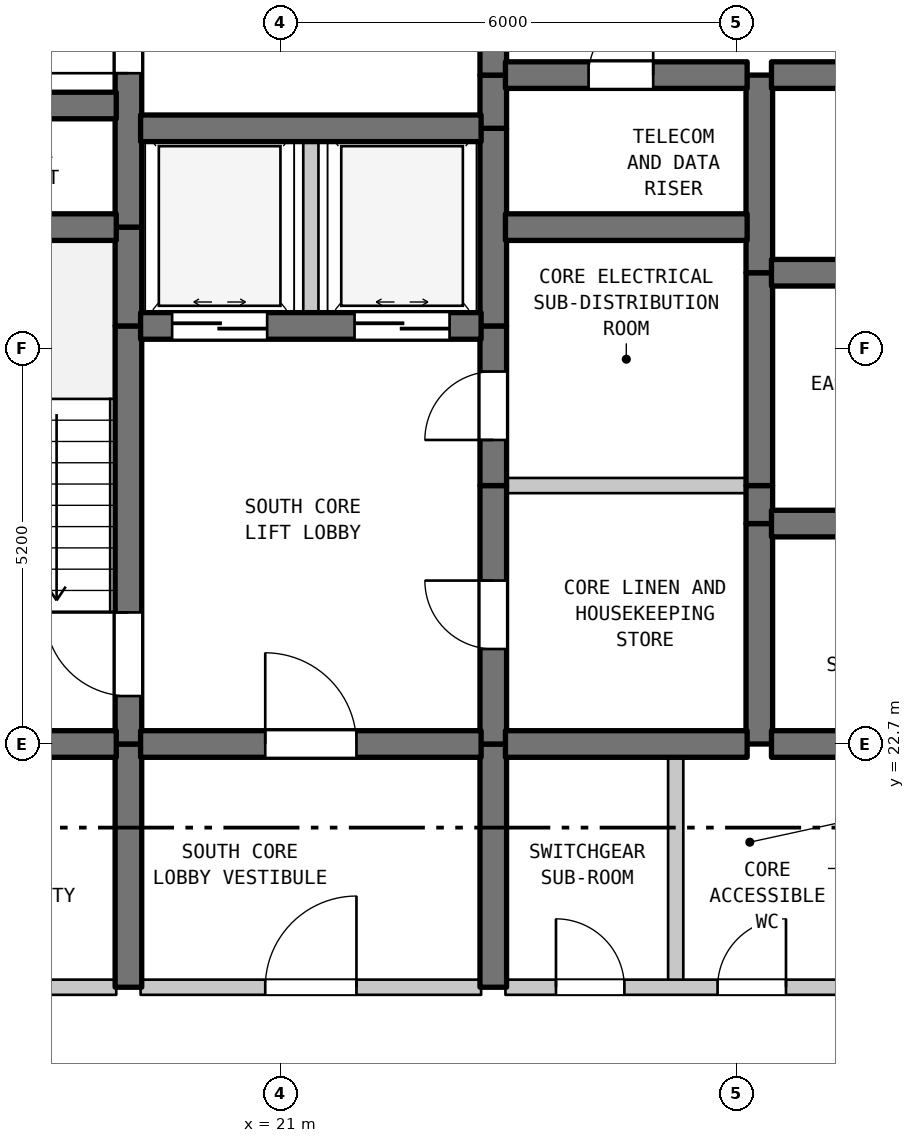
"""IFC4 building model, lengths in metres.
Left out: names, types, materials, properties, quantities, classifications, styles, units other than length and angle.
Written with IfcOpenShell. Run it as: python <this file> out.ifc"""

import sys

from ifc_helpers import new_model, si_unit, direction, frame, frame_2d, origin, place, context, subcontext, project, spatial, rectangle, extrude, element, fill, save


model = new_model("IFC4")
c1 = context("Model", 3, precision=1e-05, world=origin(), true_north=direction((0.0, 1.0)))
c2 = subcontext(c1, "Body", "Model", "MODEL_VIEW")
j1 = project(units=[si_unit("LENGTHUNIT", "METRE"), si_unit("PLANEANGLEUNIT", "RADIAN")], contexts=[c1])
p1 = place(None, origin())
s1 = spatial("IfcSite", under=j1, at=p1, CompositionType="ELEMENT")
p2 = place(p1, origin())
s2 = spatial("IfcBuilding", under=s1, at=p2, CompositionType="ELEMENT")
p3 = place(p2, frame((0.0, 0.0, 284.3)))
s3 = spatial("IfcBuildingStorey", under=s2, at=p3, CompositionType="ELEMENT", Elevation=284.3)
p4 = place(p3, frame((19.0, 19.5, 0.0), z_axis=(0.0, 0.0, 1.0), x_axis=(0.0, 1.0, 0.0)))
e1 = element("IfcWall", 1, at=p4, inside=s3, PredefinedType="SHEAR", context=c2, shape_type="SweptSolid", body=[
    extrude(rectangle(XDim=3.2, YDim=0.35, at=frame_2d((1.6, 0.0))), origin(), (0.0, 0.0, 1.0), 3.39),
])
p5 = place(p3, frame((19.0, 22.7, 0.0), z_axis=(0.0, 0.0, 1.0), x_axis=(0.0, 1.0, 0.0)))
e2 = element("IfcWall", 2, at=p5, inside=s3, PredefinedType="SHEAR", context=c2, shape_type="SweptSolid", body=[
    extrude(rectangle(XDim=5.5, YDim=0.35, at=frame_2d((2.75, 0.0))), origin(), (0.0, 0.0, 1.0), 3.39),
])
p6 = place(p5, frame((0.631, 0.0, 0.0)))
e3 = element("IfcOpeningElement", 3, at=p6, cuts=e2, PredefinedType="OPENING", context=c2, shape_type="SweptSolid", body=[
    extrude(rectangle(XDim=1.1, YDim=2.15, at=frame_2d((0.55, 1.075))), frame((0.0, 0.185, 0.0), z_axis=(0.0, -1.0, 0.0), x_axis=(1.0, 0.0, 0.0)), (0.0, 0.0, 1.0), 0.37),
])
p7 = place(p3, frame((19.0, 28.2, 0.0), z_axis=(0.0, 0.0, 1.0), x_axis=(0.0, 1.0, 0.0)))
e4 = element("IfcWall", 4, at=p7, inside=s3, PredefinedType="SHEAR", context=c2, shape_type="SweptSolid", body=[
    extrude(rectangle(XDim=1.3, YDim=0.35, at=frame_2d((0.65, 0.0))), origin(), (0.0, 0.0, 1.0), 3.39),
])
p8 = place(p3, frame((19.0, 29.5, 0.0), z_axis=(0.0, 0.0, 1.0), x_axis=(0.0, 1.0, 0.0)))
e5 = element("IfcWall", 5, at=p8, inside=s3, PredefinedType="SHEAR", context=c2, shape_type="SweptSolid", body=[
    extrude(rectangle(XDim=5.5, YDim=0.35, at=frame_2d((2.75, 0.0))), origin(), (0.0, 0.0, 1.0), 3.39),
])
p9 = place(p8, frame((2.025, 0.0, 0.0)))
e6 = element("IfcOpeningElement", 6, at=p9, cuts=e5, PredefinedType="OPENING", context=c2, shape_type="SweptSolid", body=[
    extrude(rectangle(XDim=1.1, YDim=2.15, at=frame_2d((0.55, 1.075))), frame((0.0, 0.185, 0.0), z_axis=(0.0, -1.0, 0.0), x_axis=(1.0, 0.0, 0.0)), (0.0, 0.0, 1.0), 0.37),
])
p10 = place(p3, frame((21.4, 28.2, 0.0), z_axis=(0.0, 0.0, 1.0), x_axis=(0.0, 1.0, 0.0)))
e7 = element("IfcWall", 7, at=p10, inside=s3, PredefinedType="STANDARD", context=c2, shape_type="SweptSolid", body=[
    extrude(rectangle(XDim=2.6, YDim=0.2, at=frame_2d((1.3, 0.0))), origin(), (0.0, 0.0, 1.0), 3.39),
])
p11 = place(p3, frame((23.8, 19.5, 0.0), z_axis=(0.0, 0.0, 1.0), x_axis=(0.0, 1.0, 0.0)))
e8 = element("IfcWall", 8, at=p11, inside=s3, PredefinedType="SHEAR", context=c2, shape_type="SweptSolid", body=[
    extrude(rectangle(XDim=3.2, YDim=0.35, at=frame_2d((1.6, 0.0))), origin(), (0.0, 0.0, 1.0), 3.39),
])
p12 = place(p3, frame((23.8, 22.7, 0.0), z_axis=(0.0, 0.0, 1.0), x_axis=(0.0, 1.0, 0.0)))
e9 = element("IfcWall", 9, at=p12, inside=s3, PredefinedType="SHEAR", context=c2, shape_type="SweptSolid", body=[
    extrude(rectangle(XDim=3.4, YDim=0.35, at=frame_2d((1.7, 0.0))), origin(), (0.0, 0.0, 1.0), 3.39),
])
p13 = place(p12, frame((1.25, 0.0, 0.0)))
e10 = element("IfcOpeningElement", 10, at=p13, cuts=e9, PredefinedType="OPENING", context=c2, shape_type="SweptSolid", body=[
    extrude(rectangle(XDim=0.9, YDim=2.15, at=frame_2d((0.45, 1.075))), frame((0.0, 0.185, 0.0), z_axis=(0.0, -1.0, 0.0), x_axis=(1.0, 0.0, 0.0)), (0.0, 0.0, 1.0), 0.37),
])
p14 = place(p3, frame((23.8, 26.1, 0.0), z_axis=(0.0, 0.0, 1.0), x_axis=(0.0, 1.0, 0.0)))
e11 = element("IfcWall", 11, at=p14, inside=s3, PredefinedType="SHEAR", context=c2, shape_type="SweptSolid", body=[
    extrude(rectangle(XDim=2.1, YDim=0.35, at=frame_2d((1.05, 0.0))), origin(), (0.0, 0.0, 1.0), 3.39),
])
p15 = place(p14, frame((0.6, 0.0, 0.0)))
e12 = element("IfcOpeningElement", 12, at=p15, cuts=e11, PredefinedType="OPENING", context=c2, shape_type="SweptSolid", body=[
    extrude(rectangle(XDim=0.9, YDim=2.15, at=frame_2d((0.45, 1.075))), frame((0.0, 0.185, 0.0), z_axis=(0.0, -1.0, 0.0), x_axis=(1.0, 0.0, 0.0)), (0.0, 0.0, 1.0), 0.37),
])
p16 = place(p3, frame((23.8, 28.2, 0.0), z_axis=(0.0, 0.0, 1.0), x_axis=(0.0, 1.0, 0.0)))
e13 = element("IfcWall", 13, at=p16, inside=s3, PredefinedType="SHEAR", context=c2, shape_type="SweptSolid", body=[
    extrude(rectangle(XDim=2.6, YDim=0.35, at=frame_2d((1.3, 0.0))), origin(), (0.0, 0.0, 1.0), 3.39),
])
p17 = place(p3, frame((23.8, 30.8, 0.0), z_axis=(0.0, 0.0, 1.0), x_axis=(0.0, 1.0, 0.0)))
e14 = element("IfcWall", 14, at=p17, inside=s3, PredefinedType="SHEAR", context=c2, shape_type="SweptSolid", body=[
    extrude(rectangle(XDim=0.7, YDim=0.35, at=frame_2d((0.35, 0.0))), origin(), (0.0, 0.0, 1.0), 3.39),
])
p18 = place(p3, frame((23.8, 31.5, 0.0), z_axis=(0.0, 0.0, 1.0), x_axis=(0.0, 1.0, 0.0)))
e15 = element("IfcWall", 15, at=p18, inside=s3, PredefinedType="SHEAR", context=c2, shape_type="SweptSolid", body=[
    extrude(rectangle(XDim=3.5, YDim=0.35, at=frame_2d((1.75, 0.0))), origin(), (0.0, 0.0, 1.0), 3.39),
])
p19 = place(p18, frame((1.127, 0.0, 0.0)))
e16 = element("IfcOpeningElement", 16, at=p19, cuts=e15, PredefinedType="OPENING", context=c2, shape_type="SweptSolid", body=[
    extrude(rectangle(XDim=1.1, YDim=2.15, at=frame_2d((0.55, 1.075))), frame((0.0, 0.185, 0.0), z_axis=(0.0, -1.0, 0.0), x_axis=(1.0, 0.0, 0.0)), (0.0, 0.0, 1.0), 0.37),
])
p20 = place(p3, frame((26.2, 19.5, 0.0), z_axis=(0.0, 0.0, 1.0), x_axis=(0.0, 1.0, 0.0)))
e17 = element("IfcWall", 17, at=p20, inside=s3, PredefinedType="STANDARD", context=c2, shape_type="SweptSolid", body=[
    extrude(rectangle(XDim=3.2, YDim=0.2, at=frame_2d((1.6, 0.0))), origin(), (0.0, 0.0, 1.0), 3.39),
])
p21 = place(p3, frame((27.3, 22.7, 0.0), z_axis=(0.0, 0.0, 1.0), x_axis=(0.0, 1.0, 0.0)))
e18 = element("IfcWall", 18, at=p21, inside=s3, PredefinedType="SHEAR", context=c2, shape_type="SweptSolid", body=[
    extrude(rectangle(XDim=2.9, YDim=0.35, at=frame_2d((1.45, 0.0))), origin(), (0.0, 0.0, 1.0), 3.39),
])
p22 = place(p3, frame((27.3, 25.6, 0.0), z_axis=(0.0, 0.0, 1.0), x_axis=(0.0, 1.0, 0.0)))
e19 = element("IfcWall", 19, at=p22, inside=s3, PredefinedType="SHEAR", context=c2, shape_type="SweptSolid", body=[
    extrude(rectangle(XDim=0.5, YDim=0.35, at=frame_2d((0.25, 0.0))), origin(), (0.0, 0.0, 1.0), 3.39),
])
p23 = place(p3, frame((27.3, 26.1, 0.0), z_axis=(0.0, 0.0, 1.0), x_axis=(0.0, 1.0, 0.0)))
e20 = element("IfcWall", 20, at=p23, inside=s3, PredefinedType="SHEAR", context=c2, shape_type="SweptSolid", body=[
    extrude(rectangle(XDim=2.8, YDim=0.35, at=frame_2d((1.4, 0.0))), origin(), (0.0, 0.0, 1.0), 3.39),
])
p24 = place(p3, frame((27.3, 28.9, 0.0), z_axis=(0.0, 0.0, 1.0), x_axis=(0.0, 1.0, 0.0)))
e21 = element("IfcWall", 21, at=p24, inside=s3, PredefinedType="SHEAR", context=c2, shape_type="SweptSolid", body=[
    extrude(rectangle(XDim=2.6, YDim=0.35, at=frame_2d((1.3, 0.0))), origin(), (0.0, 0.0, 1.0), 3.39),
])
p25 = place(p3, frame((15.16, 19.5, 0.0), z_axis=(0.0, 0.0, 1.0), x_axis=(1.0, 0.0, 0.0)))
e22 = element("IfcWall", 22, at=p25, inside=s3, PredefinedType="STANDARD", context=c2, shape_type="SweptSolid", body=[
    extrude(rectangle(XDim=3.68, YDim=0.2, at=frame_2d((1.84, 0.0))), origin(), (0.0, 0.0, 1.0), 3.39),
])
p26 = place(p25, frame((1.39, 0.0, 0.0)))
e23 = element("IfcOpeningElement", 23, at=p26, cuts=e22, PredefinedType="OPENING", context=c2, shape_type="SweptSolid", body=[
    extrude(rectangle(XDim=0.9, YDim=2.15, at=frame_2d((0.45, 1.075))), frame((0.0, 0.11, 0.0), z_axis=(0.0, -1.0, 0.0), x_axis=(1.0, 0.0, 0.0)), (0.0, 0.0, 1.0), 0.22),
])
p27 = place(p3, frame((19.16, 19.5, 0.0), z_axis=(0.0, 0.0, 1.0), x_axis=(1.0, 0.0, 0.0)))
e24 = element("IfcWall", 24, at=p27, inside=s3, PredefinedType="STANDARD", context=c2, shape_type="SweptSolid", body=[
    extrude(rectangle(XDim=4.48, YDim=0.2, at=frame_2d((2.24, 0.0))), origin(), (0.0, 0.0, 1.0), 3.39),
])
p28 = place(p27, frame((1.64, 0.0, 0.0)))
e25 = element("IfcOpeningElement", 25, at=p28, cuts=e24, PredefinedType="OPENING", context=c2, shape_type="SweptSolid", body=[
    extrude(rectangle(XDim=1.2, YDim=2.2, at=frame_2d((0.6, 1.1))), frame((0.0, 0.11, 0.0), z_axis=(0.0, -1.0, 0.0), x_axis=(1.0, 0.0, 0.0)), (0.0, 0.0, 1.0), 0.22),
])
p29 = place(p3, frame((23.96, 19.5, 0.0), z_axis=(0.0, 0.0, 1.0), x_axis=(1.0, 0.0, 0.0)))
e26 = element("IfcWall", 26, at=p29, inside=s3, PredefinedType="STANDARD", context=c2, shape_type="SweptSolid", body=[
    extrude(rectangle(XDim=4.455, YDim=0.2, at=frame_2d((2.228, 0.0))), origin(), (0.0, 0.0, 1.0), 3.39),
])
p30 = place(p29, frame((0.665, 0.0, 0.0)))
e27 = element("IfcOpeningElement", 27, at=p30, cuts=e26, PredefinedType="OPENING", context=c2, shape_type="SweptSolid", body=[
    extrude(rectangle(XDim=0.9, YDim=2.15, at=frame_2d((0.45, 1.075))), frame((0.0, 0.11, 0.0), z_axis=(0.0, -1.0, 0.0), x_axis=(1.0, 0.0, 0.0)), (0.0, 0.0, 1.0), 0.22),
])
p31 = place(p29, frame((2.791, 0.0, 0.0)))
e28 = element("IfcOpeningElement", 28, at=p31, cuts=e26, PredefinedType="OPENING", context=c2, shape_type="SweptSolid", body=[
    extrude(rectangle(XDim=0.9, YDim=2.15, at=frame_2d((0.45, 1.075))), frame((0.0, 0.11, 0.0), z_axis=(0.0, -1.0, 0.0), x_axis=(1.0, 0.0, 0.0)), (0.0, 0.0, 1.0), 0.22),
])
p32 = place(p3, frame((15.16, 22.7, 0.0), z_axis=(0.0, 0.0, 1.0), x_axis=(1.0, 0.0, 0.0)))
e29 = element("IfcWall", 29, at=p32, inside=s3, PredefinedType="SHEAR", context=c2, shape_type="SweptSolid", body=[
    extrude(rectangle(XDim=3.68, YDim=0.35, at=frame_2d((1.84, 0.0))), origin(), (0.0, 0.0, 1.0), 3.39),
])
p33 = place(p3, frame((19.16, 22.7, 0.0), z_axis=(0.0, 0.0, 1.0), x_axis=(1.0, 0.0, 0.0)))
e30 = element("IfcWall", 30, at=p33, inside=s3, PredefinedType="SHEAR", context=c2, shape_type="SweptSolid", body=[
    extrude(rectangle(XDim=4.48, YDim=0.35, at=frame_2d((2.24, 0.0))), origin(), (0.0, 0.0, 1.0), 3.39),
])
p34 = place(p33, frame((1.64, 0.0, 0.0)))
e31 = element("IfcOpeningElement", 31, at=p34, cuts=e30, PredefinedType="OPENING", context=c2, shape_type="SweptSolid", body=[
    extrude(rectangle(XDim=1.2, YDim=2.2, at=frame_2d((0.6, 1.1))), frame((0.0, 0.185, 0.0), z_axis=(0.0, -1.0, 0.0), x_axis=(1.0, 0.0, 0.0)), (0.0, 0.0, 1.0), 0.37),
])
p35 = place(p3, frame((23.96, 22.7, 0.0), z_axis=(0.0, 0.0, 1.0), x_axis=(1.0, 0.0, 0.0)))
e32 = element("IfcWall", 32, at=p35, inside=s3, PredefinedType="SHEAR", context=c2, shape_type="SweptSolid", body=[
    extrude(rectangle(XDim=3.18, YDim=0.35, at=frame_2d((1.59, 0.0))), origin(), (0.0, 0.0, 1.0), 3.39),
])
p36 = place(p3, frame((27.46, 22.7, 0.0), z_axis=(0.0, 0.0, 1.0), x_axis=(1.0, 0.0, 0.0)))
e33 = element("IfcWall", 33, at=p36, inside=s3, PredefinedType="SHEAR", context=c2, shape_type="SweptSolid", body=[
    extrude(rectangle(XDim=0.955, YDim=0.35, at=frame_2d((0.478, 0.0))), origin(), (0.0, 0.0, 1.0), 3.39),
])
p37 = place(p3, frame((27.46, 25.6, 0.0), z_axis=(0.0, 0.0, 1.0), x_axis=(1.0, 0.0, 0.0)))
e34 = element("IfcWall", 34, at=p37, inside=s3, PredefinedType="SHEAR", context=c2, shape_type="SweptSolid", body=[
    extrude(rectangle(XDim=3.18, YDim=0.35, at=frame_2d((1.59, 0.0))), origin(), (0.0, 0.0, 1.0), 3.39),
])
p38 = place(p37, frame((1.115, 0.0, 0.0)))
e35 = element("IfcOpeningElement", 35, at=p38, cuts=e34, PredefinedType="OPENING", context=c2, shape_type="SweptSolid", body=[
    extrude(rectangle(XDim=0.95, YDim=2.15, at=frame_2d((0.475, 1.075))), frame((0.0, 0.185, 0.0), z_axis=(0.0, -1.0, 0.0), x_axis=(1.0, 0.0, 0.0)), (0.0, 0.0, 1.0), 0.37),
])
p39 = place(p3, frame((23.96, 26.1, 0.0), z_axis=(0.0, 0.0, 1.0), x_axis=(1.0, 0.0, 0.0)))
e36 = element("IfcWall", 36, at=p39, inside=s3, PredefinedType="STANDARD", context=c2, shape_type="SweptSolid", body=[
    extrude(rectangle(XDim=3.18, YDim=0.2, at=frame_2d((1.59, 0.0))), origin(), (0.0, 0.0, 1.0), 3.39),
])
p40 = place(p3, frame((19.16, 28.2, 0.0), z_axis=(0.0, 0.0, 1.0), x_axis=(1.0, 0.0, 0.0)))
e37 = element("IfcWall", 37, at=p40, inside=s3, PredefinedType="SHEAR", context=c2, shape_type="SweptSolid", body=[
    extrude(rectangle(XDim=4.48, YDim=0.35, at=frame_2d((2.24, 0.0))), origin(), (0.0, 0.0, 1.0), 3.39),
])
p41 = place(p40, frame((0.415, 0.0, 0.0)))
e38 = element("IfcOpeningElement", 38, at=p41, cuts=e37, PredefinedType="OPENING", context=c2, shape_type="SweptSolid", body=[
    extrude(rectangle(XDim=1.25, YDim=2.2, at=frame_2d((0.625, 1.1))), frame((0.0, 0.185, 0.0), z_axis=(0.0, -1.0, 0.0), x_axis=(1.0, 0.0, 0.0)), (0.0, 0.0, 1.0), 0.37),
])
p42 = place(p40, frame((2.815, 0.0, 0.0)))
e39 = element("IfcOpeningElement", 39, at=p42, cuts=e37, PredefinedType="OPENING", context=c2, shape_type="SweptSolid", body=[
    extrude(rectangle(XDim=1.25, YDim=2.2, at=frame_2d((0.625, 1.1))), frame((0.0, 0.185, 0.0), z_axis=(0.0, -1.0, 0.0), x_axis=(1.0, 0.0, 0.0)), (0.0, 0.0, 1.0), 0.37),
])
p43 = place(p3, frame((27.46, 28.9, 0.0), z_axis=(0.0, 0.0, 1.0), x_axis=(1.0, 0.0, 0.0)))
e40 = element("IfcWall", 40, at=p43, inside=s3, PredefinedType="SHEAR", context=c2, shape_type="SweptSolid", body=[
    extrude(rectangle(XDim=3.18, YDim=0.35, at=frame_2d((1.59, 0.0))), origin(), (0.0, 0.0, 1.0), 3.39),
])
p44 = place(p43, frame((1.115, 0.0, 0.0)))
e41 = element("IfcOpeningElement", 41, at=p44, cuts=e40, PredefinedType="OPENING", context=c2, shape_type="SweptSolid", body=[
    extrude(rectangle(XDim=0.95, YDim=2.15, at=frame_2d((0.475, 1.075))), frame((0.0, 0.185, 0.0), z_axis=(0.0, -1.0, 0.0), x_axis=(1.0, 0.0, 0.0)), (0.0, 0.0, 1.0), 0.37),
])
p45 = place(p3, frame((15.16, 29.5, 0.0), z_axis=(0.0, 0.0, 1.0), x_axis=(1.0, 0.0, 0.0)))
e42 = element("IfcWall", 42, at=p45, inside=s3, PredefinedType="SHEAR", context=c2, shape_type="SweptSolid", body=[
    extrude(rectangle(XDim=3.68, YDim=0.35, at=frame_2d((1.84, 0.0))), origin(), (0.0, 0.0, 1.0), 3.39),
])
p46 = place(p3, frame((23.96, 29.5, 0.0), z_axis=(0.0, 0.0, 1.0), x_axis=(1.0, 0.0, 0.0)))
e43 = element("IfcWall", 43, at=p46, inside=s3, PredefinedType="SHEAR", context=c2, shape_type="SweptSolid", body=[
    extrude(rectangle(XDim=3.18, YDim=0.35, at=frame_2d((1.59, 0.0))), origin(), (0.0, 0.0, 1.0), 3.39),
])
p47 = place(p3, frame((19.16, 30.8, 0.0), z_axis=(0.0, 0.0, 1.0), x_axis=(1.0, 0.0, 0.0)))
e44 = element("IfcWall", 44, at=p47, inside=s3, PredefinedType="SHEAR", context=c2, shape_type="SweptSolid", body=[
    extrude(rectangle(XDim=4.48, YDim=0.35, at=frame_2d((2.24, 0.0))), origin(), (0.0, 0.0, 1.0), 3.39),
])
p48 = place(p3, frame((15.16, 31.1, 0.0), z_axis=(0.0, 0.0, 1.0), x_axis=(1.0, 0.0, 0.0)))
e45 = element("IfcWall", 45, at=p48, inside=s3, PredefinedType="SHEAR", context=c2, shape_type="SweptSolid", body=[
    extrude(rectangle(XDim=3.68, YDim=0.35, at=frame_2d((1.84, 0.0))), origin(), (0.0, 0.0, 1.0), 3.39),
])
p49 = place(p3, frame((23.96, 31.5, 0.0), z_axis=(0.0, 0.0, 1.0), x_axis=(1.0, 0.0, 0.0)))
e46 = element("IfcWall", 46, at=p49, inside=s3, PredefinedType="SHEAR", context=c2, shape_type="SweptSolid", body=[
    extrude(rectangle(XDim=3.18, YDim=0.35, at=frame_2d((1.59, 0.0))), origin(), (0.0, 0.0, 1.0), 3.39),
])
p50 = place(p49, frame((1.094, 0.0, 0.0)))
e47 = element("IfcOpeningElement", 47, at=p50, cuts=e46, PredefinedType="OPENING", context=c2, shape_type="SweptSolid", body=[
    extrude(rectangle(XDim=0.85, YDim=2.1, at=frame_2d((0.425, 1.05))), frame((0.0, 0.185, 0.0), z_axis=(0.0, -1.0, 0.0), x_axis=(1.0, 0.0, 0.0)), (0.0, 0.0, 1.0), 0.37),
])
p51 = place(p3, frame((27.46, 31.5, 0.0), z_axis=(0.0, 0.0, 1.0), x_axis=(1.0, 0.0, 0.0)))
e48 = element("IfcWall", 48, at=p51, inside=s3, PredefinedType="SHEAR", context=c2, shape_type="SweptSolid", body=[
    extrude(rectangle(XDim=3.18, YDim=0.35, at=frame_2d((1.59, 0.0))), origin(), (0.0, 0.0, 1.0), 3.39),
])
p52 = place(p6, origin())
e49 = element("IfcDoor", 49, at=p52, inside=s3, OperationType="SINGLE_SWING_RIGHT", PredefinedType="DOOR", context=c2, shape_type="SweptSolid", body=[
    extrude(rectangle(XDim=1.1, YDim=2.15, at=frame_2d((0.55, 1.075))), frame((0.0, 0.025, 0.0), z_axis=(0.0, -1.0, 0.0), x_axis=(1.0, 0.0, 0.0)), (0.0, 0.0, 1.0), 0.05),
])
fill(e3, e49)
p53 = place(p9, origin())
e50 = element("IfcDoor", 50, at=p53, inside=s3, OperationType="SINGLE_SWING_LEFT", PredefinedType="DOOR", context=c2, shape_type="SweptSolid", body=[
    extrude(rectangle(XDim=1.1, YDim=2.15, at=frame_2d((0.55, 1.075))), frame((0.0, 0.025, 0.0), z_axis=(0.0, -1.0, 0.0), x_axis=(1.0, 0.0, 0.0)), (0.0, 0.0, 1.0), 0.05),
])
fill(e6, e50)
p54 = place(p13, origin())
e51 = element("IfcDoor", 51, at=p54, inside=s3, OperationType="SINGLE_SWING_RIGHT", PredefinedType="DOOR", context=c2, shape_type="SweptSolid", body=[
    extrude(rectangle(XDim=0.9, YDim=2.15, at=frame_2d((0.45, 1.075))), frame((0.0, 0.025, 0.0), z_axis=(0.0, -1.0, 0.0), x_axis=(1.0, 0.0, 0.0)), (0.0, 0.0, 1.0), 0.05),
])
fill(e10, e51)
p55 = place(p15, origin())
e52 = element("IfcDoor", 52, at=p55, inside=s3, OperationType="SINGLE_SWING_LEFT", PredefinedType="DOOR", context=c2, shape_type="SweptSolid", body=[
    extrude(rectangle(XDim=0.9, YDim=2.15, at=frame_2d((0.45, 1.075))), frame((0.0, 0.025, 0.0), z_axis=(0.0, -1.0, 0.0), x_axis=(1.0, 0.0, 0.0)), (0.0, 0.0, 1.0), 0.05),
])
fill(e12, e52)
p56 = place(p28, origin())
e53 = element("IfcDoor", 53, at=p56, inside=s3, OperationType="SINGLE_SWING_RIGHT", PredefinedType="DOOR", context=c2, shape_type="SweptSolid", body=[
    extrude(rectangle(XDim=1.2, YDim=2.2, at=frame_2d((0.6, 1.1))), frame((0.0, 0.025, 0.0), z_axis=(0.0, -1.0, 0.0), x_axis=(1.0, 0.0, 0.0)), (0.0, 0.0, 1.0), 0.05),
])
fill(e25, e53)
p57 = place(p30, origin())
e54 = element("IfcDoor", 54, at=p57, inside=s3, OperationType="SINGLE_SWING_LEFT", PredefinedType="DOOR", context=c2, shape_type="SweptSolid", body=[
    extrude(rectangle(XDim=0.9, YDim=2.15, at=frame_2d((0.45, 1.075))), frame((0.0, 0.025, 0.0), z_axis=(0.0, -1.0, 0.0), x_axis=(1.0, 0.0, 0.0)), (0.0, 0.0, 1.0), 0.05),
])
fill(e27, e54)
p58 = place(p31, origin())
e55 = element("IfcDoor", 55, at=p58, inside=s3, OperationType="SINGLE_SWING_RIGHT", PredefinedType="DOOR", context=c2, shape_type="SweptSolid", body=[
    extrude(rectangle(XDim=0.9, YDim=2.15, at=frame_2d((0.45, 1.075))), frame((0.0, 0.025, 0.0), z_axis=(0.0, -1.0, 0.0), x_axis=(1.0, 0.0, 0.0)), (0.0, 0.0, 1.0), 0.05),
])
fill(e28, e55)
p59 = place(p34, origin())
e56 = element("IfcDoor", 56, at=p59, inside=s3, OperationType="SINGLE_SWING_LEFT", PredefinedType="DOOR", context=c2, shape_type="SweptSolid", body=[
    extrude(rectangle(XDim=1.2, YDim=2.2, at=frame_2d((0.6, 1.1))), frame((0.0, 0.025, 0.0), z_axis=(0.0, -1.0, 0.0), x_axis=(1.0, 0.0, 0.0)), (0.0, 0.0, 1.0), 0.05),
])
fill(e31, e56)
p60 = place(p41, origin())
e57 = element("IfcDoor", 57, at=p60, inside=s3, OperationType="DOUBLE_DOOR_SLIDING", PredefinedType="DOOR", context=c2, shape_type="SweptSolid", body=[
    extrude(rectangle(XDim=1.25, YDim=2.2, at=frame_2d((0.625, 1.1))), frame((0.0, 0.025, 0.0), z_axis=(0.0, -1.0, 0.0), x_axis=(1.0, 0.0, 0.0)), (0.0, 0.0, 1.0), 0.05),
])
fill(e38, e57)
p61 = place(p42, origin())
e58 = element("IfcDoor", 58, at=p61, inside=s3, OperationType="DOUBLE_DOOR_SLIDING", PredefinedType="DOOR", context=c2, shape_type="SweptSolid", body=[
    extrude(rectangle(XDim=1.25, YDim=2.2, at=frame_2d((0.625, 1.1))), frame((0.0, 0.025, 0.0), z_axis=(0.0, -1.0, 0.0), x_axis=(1.0, 0.0, 0.0)), (0.0, 0.0, 1.0), 0.05),
])
fill(e39, e58)
p62 = place(p50, origin())
e59 = element("IfcDoor", 59, at=p62, inside=s3, OperationType="SINGLE_SWING_RIGHT", PredefinedType="DOOR", context=c2, shape_type="SweptSolid", body=[
    extrude(rectangle(XDim=0.85, YDim=2.1, at=frame_2d((0.425, 1.05))), frame((0.0, 0.025, 0.0), z_axis=(0.0, -1.0, 0.0), x_axis=(1.0, 0.0, 0.0)), (0.0, 0.0, 1.0), 0.05),
])
fill(e47, e59)
save(model, sys.argv[1])
